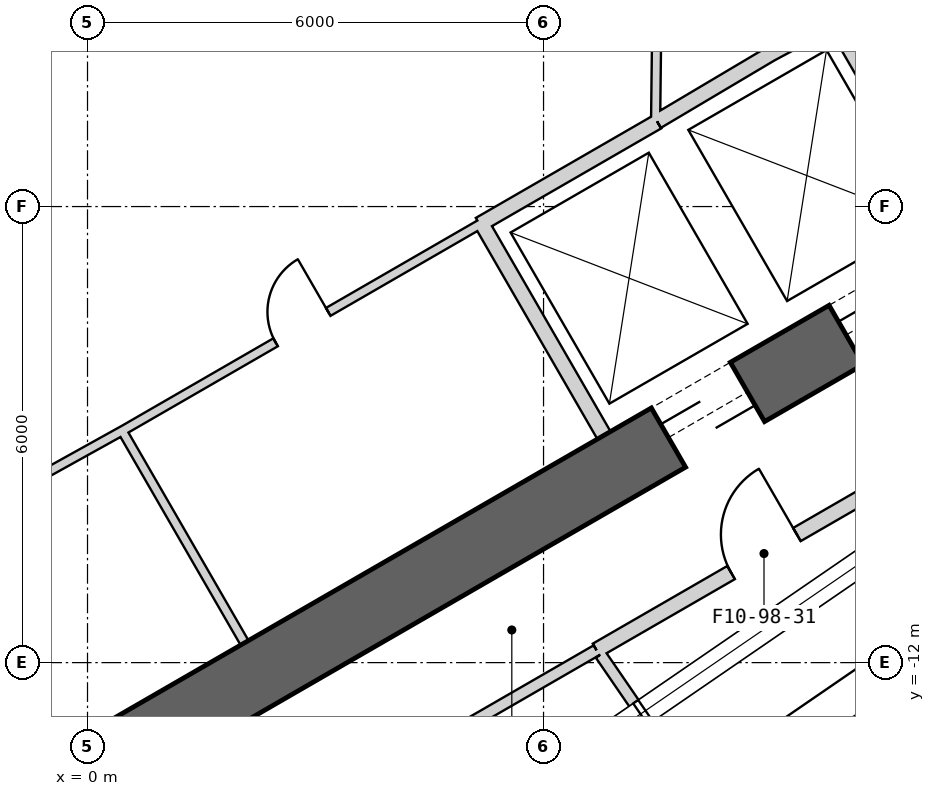
"""IFC4 building model, lengths in metres.
Left out: names, types, materials, properties, quantities, classifications, styles, units other than length and angle.
Written with IfcOpenShell. Run it as: python <this file> out.ifc"""

import sys

from ifc_helpers import new_model, si_unit, direction, frame, frame_2d, origin, place, context, subcontext, project, spatial, rectangle, extrude, element, fill, save


model = new_model("IFC4")
c1 = context("Model", 3, precision=1e-05, world=origin(), true_north=direction((0.0, 1.0)))
c2 = subcontext(c1, "Body", "Model", "MODEL_VIEW")
j1 = project(units=[si_unit("LENGTHUNIT", "METRE"), si_unit("PLANEANGLEUNIT", "RADIAN")], contexts=[c1])
p1 = place(None, origin())
s1 = spatial("IfcSite", under=j1, at=p1, CompositionType="ELEMENT")
p2 = place(p1, origin())
s2 = spatial("IfcBuilding", under=s1, at=p2, CompositionType="ELEMENT")
p3 = place(p2, frame((0.0, 0.0, 435.3)))
s3 = spatial("IfcBuildingStorey", under=s2, at=p3, CompositionType="ELEMENT", Elevation=435.3)
p4 = place(p3, frame((-7.825, -17.97, 0.0), z_axis=(0.0, 0.0, 1.0), x_axis=(0.866028369851, 0.499994862586, 0.0)))
e1 = element("IfcWall", 1, at=p4, inside=s3, PredefinedType="SHEAR", context=c2, shape_type="SweptSolid", body=[
    extrude(rectangle(XDim=31.523, YDim=0.9, at=frame_2d((15.762, 0.0))), origin(), (0.0, 0.0, 1.0), 5.0),
])
p5 = place(p4, frame((17.862, 0.0, 0.0)))
e2 = element("IfcOpeningElement", 2, at=p5, cuts=e1, PredefinedType="OPENING", context=c2, shape_type="SweptSolid", body=[
    extrude(rectangle(XDim=1.2, YDim=2.4, at=frame_2d((0.6, 1.2))), frame((0.0, 0.46, 0.0), z_axis=(0.0, -1.0, 0.0), x_axis=(1.0, 0.0, 0.0)), (0.0, 0.0, 1.0), 0.92),
])
p6 = place(p4, frame((20.562, 0.0, 0.0)))
e3 = element("IfcOpeningElement", 3, at=p6, cuts=e1, PredefinedType="OPENING", context=c2, shape_type="SweptSolid", body=[
    extrude(rectangle(XDim=1.2, YDim=2.4, at=frame_2d((0.6, 1.2))), frame((0.0, 0.46, 0.0), z_axis=(0.0, -1.0, 0.0), x_axis=(1.0, 0.0, 0.0)), (0.0, 0.0, 1.0), 0.92),
])
p7 = place(p4, frame((26.712, 0.0, 0.0)))
e4 = element("IfcOpeningElement", 4, at=p7, cuts=e1, PredefinedType="OPENING", context=c2, shape_type="SweptSolid", body=[
    extrude(rectangle(XDim=1.2, YDim=2.4, at=frame_2d((0.6, 1.2))), frame((0.0, 0.46, 0.0), z_axis=(0.0, -1.0, 0.0), x_axis=(1.0, 0.0, 0.0)), (0.0, 0.0, 1.0), 0.92),
])
p8 = place(p4, frame((3.612, 0.0, 0.0)))
e5 = element("IfcOpeningElement", 5, at=p8, cuts=e1, PredefinedType="OPENING", context=c2, shape_type="SweptSolid", body=[
    extrude(rectangle(XDim=1.2, YDim=2.4, at=frame_2d((0.6, 1.2))), frame((0.0, 0.46, 0.0), z_axis=(0.0, -1.0, 0.0), x_axis=(1.0, 0.0, 0.0)), (0.0, 0.0, 1.0), 0.92),
])
p9 = place(p3, frame((6.795, -9.01, 0.0), z_axis=(0.0, 0.0, 1.0), x_axis=(-0.499984717929, 0.866034226713, 0.0)))
e6 = element("IfcWall", 6, at=p9, inside=s3, PredefinedType="PLUMBINGWALL", context=c2, shape_type="SweptSolid", body=[
    extrude(rectangle(XDim=3.25, YDim=0.2, at=frame_2d((1.625, 0.0))), origin(), (0.0, 0.0, 1.0), 4.75),
])
p10 = place(p3, frame((5.159, -6.236, 0.0), z_axis=(0.0, 0.0, 1.0), x_axis=(0.866036505625, 0.499980770555, 0.0)))
e7 = element("IfcWall", 7, at=p10, inside=s3, PredefinedType="PLUMBINGWALL", context=c2, shape_type="SweptSolid", body=[
    extrude(rectangle(XDim=2.7, YDim=0.2, at=frame_2d((1.35, 0.0))), origin(), (0.0, 0.0, 1.0), 4.75),
])
p11 = place(p3, frame((9.795, -3.525, 0.0), z_axis=(0.0, 0.0, 1.0), x_axis=(0.499984717929, -0.866034226713, 0.0)))
e8 = element("IfcWall", 8, at=p11, inside=s3, PredefinedType="PLUMBINGWALL", context=c2, shape_type="SweptSolid", body=[
    extrude(rectangle(XDim=3.25, YDim=0.2, at=frame_2d((1.625, 0.0))), origin(), (0.0, 0.0, 1.0), 4.75),
])
p12 = place(p3, frame((8.974, -3.999, 0.0), z_axis=(0.0, 0.0, 1.0), x_axis=(0.880907015104, 0.473289373154, 0.0)))
e9 = element("IfcWall", 9, at=p12, inside=s3, PredefinedType="PLUMBINGWALL", context=c2, shape_type="SweptSolid", body=[
    extrude(rectangle(XDim=1.078, YDim=0.2, at=frame_2d((0.539, 0.0))), origin(), (0.0, 0.0, 1.0), 4.75),
])
p13 = place(p3, frame((7.493, -4.878, 0.0), z_axis=(0.0, 0.0, 1.0), x_axis=(0.859981807212, 0.510324691999, 0.0)))
e10 = element("IfcWall", 10, at=p13, inside=s3, PredefinedType="PLUMBINGWALL", context=c2, shape_type="SweptSolid", body=[
    extrude(rectangle(XDim=1.845, YDim=0.2, at=frame_2d((0.922, 0.0))), origin(), (0.0, 0.0, 1.0), 4.75),
])
p14 = place(p3, frame((2.067, -11.74, 0.0), z_axis=(0.0, 0.0, 1.0), x_axis=(-0.499984717929, 0.866034226713, 0.0)))
e11 = element("IfcWall", 11, at=p14, inside=s3, PredefinedType="PARTITIONING", context=c2, shape_type="SweptSolid", body=[
    extrude(rectangle(XDim=3.25, YDim=0.12, at=frame_2d((1.625, 0.0))), origin(), (0.0, 0.0, 1.0), 4.75),
])
p15 = place(p3, frame((-1.023, -9.772, 0.0), z_axis=(0.0, 0.0, 1.0), x_axis=(0.874290944206, 0.485402250592, 0.0)))
e12 = element("IfcWall", 12, at=p15, inside=s3, PredefinedType="PARTITIONING", context=c2, shape_type="SweptSolid", body=[
    extrude(rectangle(XDim=1.723, YDim=0.12, at=frame_2d((0.861, 0.0))), origin(), (0.0, 0.0, 1.0), 4.75),
])
p16 = place(p3, frame((0.483, -8.936, 0.0), z_axis=(0.0, 0.0, 1.0), x_axis=(0.866028230842, 0.499995103361, 0.0)))
e13 = element("IfcWall", 13, at=p16, inside=s3, PredefinedType="PARTITIONING", context=c2, shape_type="SweptSolid", body=[
    extrude(rectangle(XDim=5.4, YDim=0.12, at=frame_2d((2.7, 0.0))), origin(), (0.0, 0.0, 1.0), 4.75),
])
p17 = place(p16, frame((2.3, 0.0, 0.0)))
e14 = element("IfcOpeningElement", 14, at=p17, cuts=e13, PredefinedType="OPENING", context=c2, shape_type="SweptSolid", body=[
    extrude(rectangle(XDim=0.8, YDim=2.1, at=frame_2d((0.4, 1.05))), frame((0.0, 0.07, 0.0), z_axis=(0.0, -1.0, 0.0), x_axis=(1.0, 0.0, 0.0)), (0.0, 0.0, 1.0), 0.14),
])
p18 = place(p3, frame((0.051, -1.611, 0.0), z_axis=(0.0, 0.0, 1.0), x_axis=(-0.49434454467, -0.869266053148, 0.0)))
e15 = element("IfcWall", 15, at=p18, inside=s3, PredefinedType="PARTITIONING", context=c2, shape_type="SweptSolid", body=[
    extrude(rectangle(XDim=4.53, YDim=0.12, at=frame_2d((2.265, 0.0))), origin(), (0.0, 0.0, 1.0), 4.75),
])
p19 = place(p18, frame((1.916, 0.0, 0.0)))
e16 = element("IfcOpeningElement", 16, at=p19, cuts=e15, PredefinedType="OPENING", context=c2, shape_type="SweptSolid", body=[
    extrude(rectangle(XDim=0.8, YDim=2.1, at=frame_2d((0.4, 1.05))), frame((0.0, 0.07, 0.0), z_axis=(0.0, -1.0, 0.0), x_axis=(1.0, 0.0, 0.0)), (0.0, 0.0, 1.0), 0.14),
])
p20 = place(p3, frame((7.475, -4.865, 0.0), z_axis=(0.0, 0.0, 1.0), x_axis=(0.011716133148, 0.999931363757, 0.0)))
e17 = element("IfcWall", 17, at=p20, inside=s3, PredefinedType="PARTITIONING", context=c2, shape_type="SweptSolid", body=[
    extrude(rectangle(XDim=2.105, YDim=0.12, at=frame_2d((1.052, 0.0))), origin(), (0.0, 0.0, 1.0), 4.75),
])
p21 = place(p3, frame((-7.213, -19.868, 0.0), z_axis=(0.0, 0.0, 1.0), x_axis=(0.866026120779, 0.499998758127, 0.0)))
e18 = element("IfcWall", 18, at=p21, inside=s3, PredefinedType="PLUMBINGWALL", context=c2, shape_type="SweptSolid", body=[
    extrude(rectangle(XDim=16.062, YDim=0.15, at=frame_2d((8.031, 0.0))), origin(), (0.0, 0.0, 1.0), 4.75),
])
p22 = place(p21, frame((7.675, 0.0, 0.0)))
e19 = element("IfcOpeningElement", 19, at=p22, cuts=e18, PredefinedType="OPENING", context=c2, shape_type="SweptSolid", body=[
    extrude(rectangle(XDim=0.8, YDim=2.1, at=frame_2d((0.4, 1.05))), frame((0.0, 0.085, 0.0), z_axis=(0.0, -1.0, 0.0), x_axis=(1.0, 0.0, 0.0)), (0.0, 0.0, 1.0), 0.17),
])
p23 = place(p3, frame((6.698, -11.837, 0.0), z_axis=(0.0, 0.0, 1.0), x_axis=(0.866022444471, 0.500005125646, 0.0)))
e20 = element("IfcWall", 20, at=p23, inside=s3, PredefinedType="PARTITIONING", context=c2, shape_type="SweptSolid", body=[
    extrude(rectangle(XDim=16.124, YDim=0.2, at=frame_2d((8.062, 0.0))), origin(), (0.0, 0.0, 1.0), 4.75),
])
p24 = place(p23, frame((2.044, 0.0, 0.0)))
e21 = element("IfcOpeningElement", 21, at=p24, cuts=e20, PredefinedType="OPENING", context=c2, shape_type="SweptSolid", body=[
    extrude(rectangle(XDim=1.0, YDim=2.1, at=frame_2d((0.5, 1.05))), frame((0.0, 0.11, 0.0), z_axis=(0.0, -1.0, 0.0), x_axis=(1.0, 0.0, 0.0)), (0.0, 0.0, 1.0), 0.22),
])
p25 = place(p3, frame((7.213, -12.568, 0.0), z_axis=(0.0, 0.0, 1.0), x_axis=(-0.565933909506, 0.824450611056, 0.0)))
e22 = element("IfcWall", 22, at=p25, inside=s3, PredefinedType="PLUMBINGWALL", context=c2, shape_type="SweptSolid", body=[
    extrude(rectangle(XDim=0.819, YDim=0.15, at=frame_2d((0.409, 0.0))), origin(), (0.0, 0.0, 1.0), 4.75),
])
p26 = place(p17, origin())
e23 = element("IfcDoor", 23, at=p26, inside=s3, OperationType="SINGLE_SWING_RIGHT", PredefinedType="USERDEFINED", context=c2, shape_type="SweptSolid", body=[
    extrude(rectangle(XDim=0.8, YDim=2.1, at=frame_2d((0.4, 1.05))), frame((0.0, 0.025, 0.0), z_axis=(0.0, -1.0, 0.0), x_axis=(1.0, 0.0, 0.0)), (0.0, 0.0, 1.0), 0.05),
])
fill(e14, e23)
p27 = place(p24, origin())
e24 = element("IfcDoor", 24, at=p27, inside=s3, OperationType="SINGLE_SWING_RIGHT", PredefinedType="USERDEFINED", context=c2, shape_type="SweptSolid", body=[
    extrude(rectangle(XDim=1.0, YDim=2.1, at=frame_2d((0.5, 1.05))), frame((0.0, 0.025, 0.0), z_axis=(0.0, -1.0, 0.0), x_axis=(1.0, 0.0, 0.0)), (0.0, 0.0, 1.0), 0.05),
])
fill(e21, e24)
p28 = place(p5, origin())
e25 = element("IfcDoor", 25, at=p28, inside=s3, OperationType="SLIDING_TO_LEFT", PredefinedType="USERDEFINED", context=c2, shape_type="SweptSolid", body=[
    extrude(rectangle(XDim=1.2, YDim=2.4, at=frame_2d((0.6, 1.2))), frame((0.0, 0.025, 0.0), z_axis=(0.0, -1.0, 0.0), x_axis=(1.0, 0.0, 0.0)), (0.0, 0.0, 1.0), 0.05),
])
fill(e2, e25)
p29 = place(p6, origin())
e26 = element("IfcDoor", 26, at=p29, inside=s3, OperationType="SLIDING_TO_LEFT", PredefinedType="USERDEFINED", context=c2, shape_type="SweptSolid", body=[
    extrude(rectangle(XDim=1.2, YDim=2.4, at=frame_2d((0.6, 1.2))), frame((0.0, 0.025, 0.0), z_axis=(0.0, -1.0, 0.0), x_axis=(1.0, 0.0, 0.0)), (0.0, 0.0, 1.0), 0.05),
])
fill(e3, e26)
save(model, sys.argv[1])
